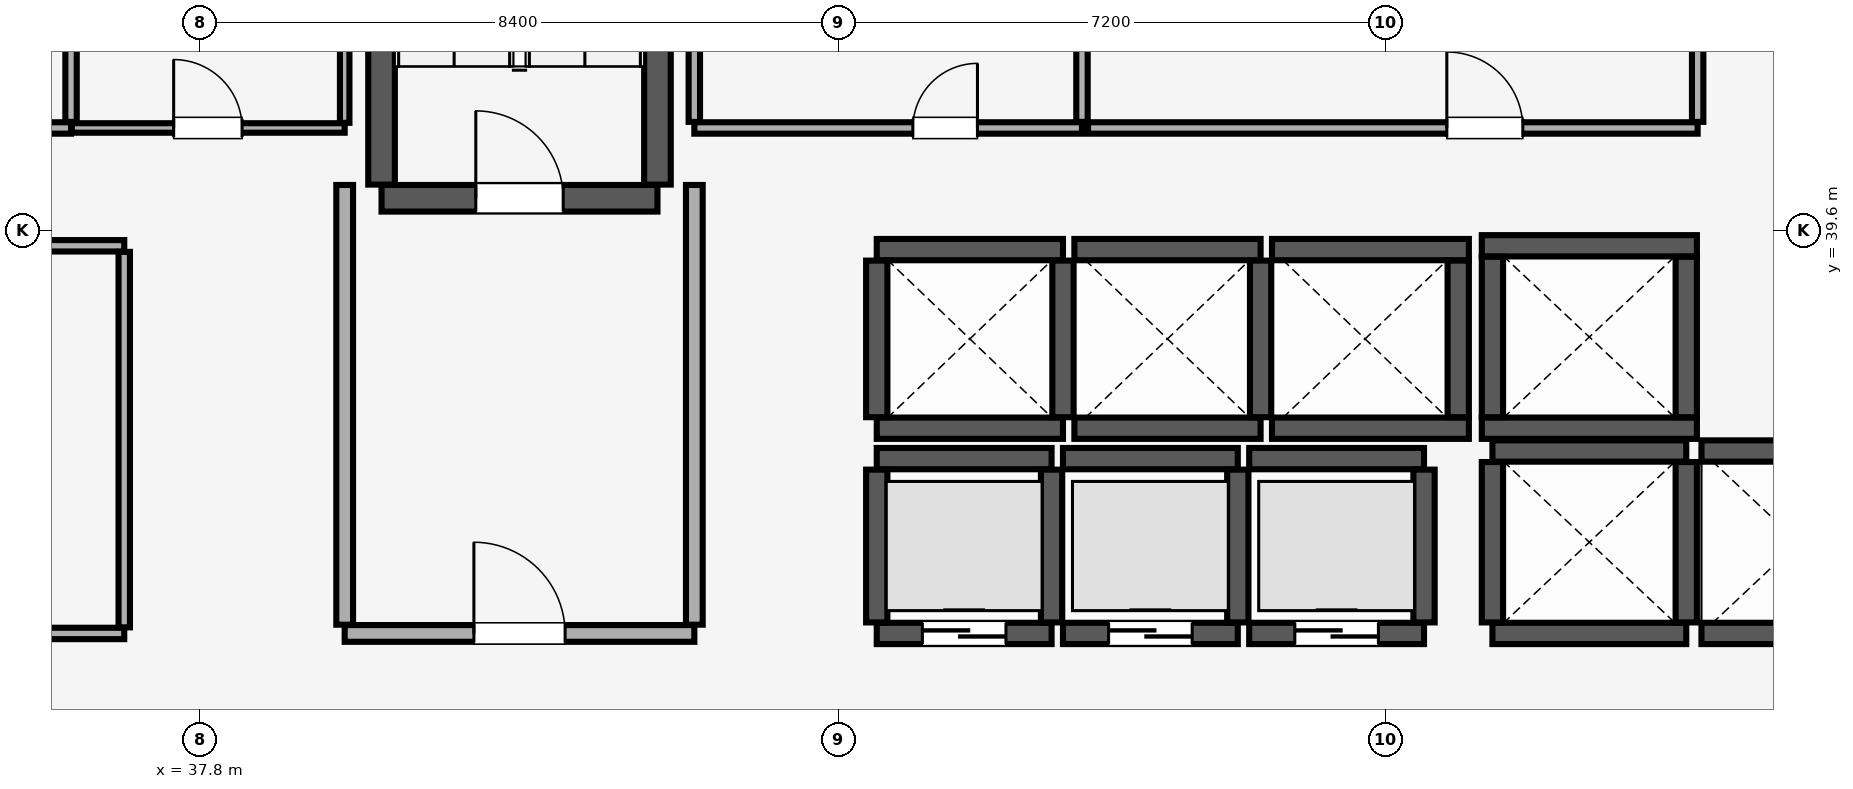
"""IFC4 building model, lengths in metres.
Left out: names, types, materials, properties, quantities, classifications, styles, units other than length and angle.
Written with IfcOpenShell. Run it as: python <this file> out.ifc"""

import sys

from ifc_helpers import new_model, si_unit, direction, frame, frame_2d, origin, place, context, subcontext, project, spatial, rectangle, extrude, element, fill, save


model = new_model("IFC4")
c1 = context("Model", 3, precision=1e-05, world=origin(), true_north=direction((0.0, 1.0)))
c2 = subcontext(c1, "Body", "Model", "MODEL_VIEW")
j1 = project(units=[si_unit("LENGTHUNIT", "METRE"), si_unit("PLANEANGLEUNIT", "RADIAN")], contexts=[c1])
p1 = place(None, origin())
s1 = spatial("IfcSite", under=j1, at=p1, CompositionType="ELEMENT")
p2 = place(p1, origin())
s2 = spatial("IfcBuilding", under=s1, at=p2, CompositionType="ELEMENT")
p3 = place(p2, frame((0.0, 0.0, 220.55)))
s3 = spatial("IfcBuildingStorey", under=s2, at=p3, CompositionType="ELEMENT", Elevation=220.55)
p4 = place(p3, frame((40.185, 40.025, 0.0), z_axis=(0.0, 0.0, 1.0), x_axis=(1.0, 0.0, 0.0)))
e1 = element("IfcWall", 1, at=p4, inside=s3, PredefinedType="SHEAR", context=c2, shape_type="SweptSolid", body=[
    extrude(rectangle(XDim=3.63, YDim=0.35, at=frame_2d((1.815, 0.0))), origin(), (0.0, 0.0, 1.0), 3.56),
])
p5 = place(p4, frame((1.24, 0.0, 0.0)))
e2 = element("IfcOpeningElement", 2, at=p5, cuts=e1, PredefinedType="OPENING", context=c2, shape_type="SweptSolid", body=[
    extrude(rectangle(XDim=1.15, YDim=2.15, at=frame_2d((0.575, 1.075))), frame((0.0, 0.185, 0.0), z_axis=(0.0, -1.0, 0.0), x_axis=(1.0, 0.0, 0.0)), (0.0, 0.0, 1.0), 0.37),
])
for number, where, z_axis, x_axis in (
    (3, (40.185, 40.205, 0.0), (0.0, 0.0, 1.0), (0.0, 1.0, 0.0)),
    (4, (43.815, 40.205, 0.0), (0.0, 0.0, 1.0), (0.0, 1.0, 0.0)),
):
    element("IfcWall", number, at=place(p3, frame(where, z_axis=z_axis, x_axis=x_axis)), inside=s3, PredefinedType="SHEAR", context=c2, shape_type="SweptSolid", body=[
        extrude(rectangle(XDim=8.09, YDim=0.35, at=frame_2d((4.045, 0.0))), origin(), (0.0, 0.0, 1.0), 3.56),
    ])
p6 = place(p3, frame((46.7, 34.3, 0.0), z_axis=(0.0, 0.0, 1.0), x_axis=(1.0, 0.0, 0.0)))
e5 = element("IfcWall", 5, at=p6, inside=s3, PredefinedType="SHEAR", context=c2, shape_type="SweptSolid", body=[
    extrude(rectangle(XDim=2.3, YDim=0.28, at=frame_2d((1.15, 0.0))), origin(), (0.0, 0.0, 1.0), 3.56),
])
p7 = place(p6, frame((0.6, 0.0, 0.0)))
e6 = element("IfcOpeningElement", 6, at=p7, cuts=e5, PredefinedType="OPENING", context=c2, shape_type="SweptSolid", body=[
    extrude(rectangle(XDim=1.1, YDim=2.2, at=frame_2d((0.55, 1.1))), frame((0.0, 0.15, 0.0), z_axis=(0.0, -1.0, 0.0), x_axis=(1.0, 0.0, 0.0)), (0.0, 0.0, 1.0), 0.3),
])
p8 = place(p3, frame((46.7, 36.6, 0.0), z_axis=(0.0, 0.0, 1.0), x_axis=(1.0, 0.0, 0.0)))
e7 = element("IfcWall", 7, at=p8, inside=s3, PredefinedType="SHEAR", context=c2, shape_type="SweptSolid", body=[
    extrude(rectangle(XDim=2.3, YDim=0.28, at=frame_2d((1.15, 0.0))), origin(), (0.0, 0.0, 1.0), 3.56),
])
for number, where, z_axis, x_axis in (
    (8, (46.7, 34.445, 0.0), (0.0, 0.0, 1.0), (0.0, 1.0, 0.0)),
    (9, (49.0, 34.445, 0.0), (0.0, 0.0, 1.0), (0.0, 1.0, 0.0)),
):
    element("IfcWall", number, at=place(p3, frame(where, z_axis=z_axis, x_axis=x_axis)), inside=s3, PredefinedType="SHEAR", context=c2, shape_type="SweptSolid", body=[
        extrude(rectangle(XDim=2.01, YDim=0.28, at=frame_2d((1.005, 0.0))), origin(), (0.0, 0.0, 1.0), 3.56),
    ])
p9 = place(p3, frame((49.15, 34.3, 0.0), z_axis=(0.0, 0.0, 1.0), x_axis=(1.0, 0.0, 0.0)))
e10 = element("IfcWall", 10, at=p9, inside=s3, PredefinedType="SHEAR", context=c2, shape_type="SweptSolid", body=[
    extrude(rectangle(XDim=2.3, YDim=0.28, at=frame_2d((1.15, 0.0))), origin(), (0.0, 0.0, 1.0), 3.56),
])
p10 = place(p9, frame((0.6, 0.0, 0.0)))
e11 = element("IfcOpeningElement", 11, at=p10, cuts=e10, PredefinedType="OPENING", context=c2, shape_type="SweptSolid", body=[
    extrude(rectangle(XDim=1.1, YDim=2.2, at=frame_2d((0.55, 1.1))), frame((0.0, 0.15, 0.0), z_axis=(0.0, -1.0, 0.0), x_axis=(1.0, 0.0, 0.0)), (0.0, 0.0, 1.0), 0.3),
])
p11 = place(p3, frame((49.15, 36.6, 0.0), z_axis=(0.0, 0.0, 1.0), x_axis=(1.0, 0.0, 0.0)))
e12 = element("IfcWall", 12, at=p11, inside=s3, PredefinedType="SHEAR", context=c2, shape_type="SweptSolid", body=[
    extrude(rectangle(XDim=2.3, YDim=0.28, at=frame_2d((1.15, 0.0))), origin(), (0.0, 0.0, 1.0), 3.56),
])
p12 = place(p3, frame((51.45, 34.445, 0.0), z_axis=(0.0, 0.0, 1.0), x_axis=(0.0, 1.0, 0.0)))
e13 = element("IfcWall", 13, at=p12, inside=s3, PredefinedType="SHEAR", context=c2, shape_type="SweptSolid", body=[
    extrude(rectangle(XDim=2.01, YDim=0.28, at=frame_2d((1.005, 0.0))), origin(), (0.0, 0.0, 1.0), 3.56),
])
p13 = place(p3, frame((51.6, 34.3, 0.0), z_axis=(0.0, 0.0, 1.0), x_axis=(1.0, 0.0, 0.0)))
e14 = element("IfcWall", 14, at=p13, inside=s3, PredefinedType="SHEAR", context=c2, shape_type="SweptSolid", body=[
    extrude(rectangle(XDim=2.3, YDim=0.28, at=frame_2d((1.15, 0.0))), origin(), (0.0, 0.0, 1.0), 3.56),
])
p14 = place(p13, frame((0.6, 0.0, 0.0)))
e15 = element("IfcOpeningElement", 15, at=p14, cuts=e14, PredefinedType="OPENING", context=c2, shape_type="SweptSolid", body=[
    extrude(rectangle(XDim=1.1, YDim=2.2, at=frame_2d((0.55, 1.1))), frame((0.0, 0.15, 0.0), z_axis=(0.0, -1.0, 0.0), x_axis=(1.0, 0.0, 0.0)), (0.0, 0.0, 1.0), 0.3),
])
p15 = place(p3, frame((51.6, 36.6, 0.0), z_axis=(0.0, 0.0, 1.0), x_axis=(1.0, 0.0, 0.0)))
e16 = element("IfcWall", 16, at=p15, inside=s3, PredefinedType="SHEAR", context=c2, shape_type="SweptSolid", body=[
    extrude(rectangle(XDim=2.3, YDim=0.28, at=frame_2d((1.15, 0.0))), origin(), (0.0, 0.0, 1.0), 3.56),
])
p16 = place(p3, frame((53.9, 34.445, 0.0), z_axis=(0.0, 0.0, 1.0), x_axis=(0.0, 1.0, 0.0)))
e17 = element("IfcWall", 17, at=p16, inside=s3, PredefinedType="SHEAR", context=c2, shape_type="SweptSolid", body=[
    extrude(rectangle(XDim=2.01, YDim=0.28, at=frame_2d((1.005, 0.0))), origin(), (0.0, 0.0, 1.0), 3.56),
])
for number, where, z_axis, x_axis in (
    (18, (46.7, 37.0, 0.0), (0.0, 0.0, 1.0), (1.0, 0.0, 0.0)),
    (19, (46.7, 39.35, 0.0), (0.0, 0.0, 1.0), (1.0, 0.0, 0.0)),
):
    element("IfcWall", number, at=place(p3, frame(where, z_axis=z_axis, x_axis=x_axis)), inside=s3, PredefinedType="SHEAR", context=c2, shape_type="SweptSolid", body=[
        extrude(rectangle(XDim=2.45, YDim=0.28, at=frame_2d((1.225, 0.0))), origin(), (0.0, 0.0, 1.0), 3.56),
    ])
for number, where, z_axis, x_axis in (
    (20, (46.7, 37.145, 0.0), (0.0, 0.0, 1.0), (0.0, 1.0, 0.0)),
    (21, (49.15, 37.145, 0.0), (0.0, 0.0, 1.0), (0.0, 1.0, 0.0)),
):
    element("IfcWall", number, at=place(p3, frame(where, z_axis=z_axis, x_axis=x_axis)), inside=s3, PredefinedType="SHEAR", context=c2, shape_type="SweptSolid", body=[
        extrude(rectangle(XDim=2.06, YDim=0.28, at=frame_2d((1.03, 0.0))), origin(), (0.0, 0.0, 1.0), 3.56),
    ])
for number, where, z_axis, x_axis in (
    (22, (49.3, 37.0, 0.0), (0.0, 0.0, 1.0), (1.0, 0.0, 0.0)),
    (23, (49.3, 39.35, 0.0), (0.0, 0.0, 1.0), (1.0, 0.0, 0.0)),
):
    element("IfcWall", number, at=place(p3, frame(where, z_axis=z_axis, x_axis=x_axis)), inside=s3, PredefinedType="SHEAR", context=c2, shape_type="SweptSolid", body=[
        extrude(rectangle(XDim=2.45, YDim=0.28, at=frame_2d((1.225, 0.0))), origin(), (0.0, 0.0, 1.0), 3.56),
    ])
p17 = place(p3, frame((51.75, 37.145, 0.0), z_axis=(0.0, 0.0, 1.0), x_axis=(0.0, 1.0, 0.0)))
e24 = element("IfcWall", 24, at=p17, inside=s3, PredefinedType="SHEAR", context=c2, shape_type="SweptSolid", body=[
    extrude(rectangle(XDim=2.06, YDim=0.28, at=frame_2d((1.03, 0.0))), origin(), (0.0, 0.0, 1.0), 3.56),
])
for number, where, z_axis, x_axis in (
    (25, (51.9, 37.0, 0.0), (0.0, 0.0, 1.0), (1.0, 0.0, 0.0)),
    (26, (51.9, 39.35, 0.0), (0.0, 0.0, 1.0), (1.0, 0.0, 0.0)),
):
    element("IfcWall", number, at=place(p3, frame(where, z_axis=z_axis, x_axis=x_axis)), inside=s3, PredefinedType="SHEAR", context=c2, shape_type="SweptSolid", body=[
        extrude(rectangle(XDim=2.59, YDim=0.28, at=frame_2d((1.295, 0.0))), origin(), (0.0, 0.0, 1.0), 3.56),
    ])
p18 = place(p3, frame((54.35, 37.145, 0.0), z_axis=(0.0, 0.0, 1.0), x_axis=(0.0, 1.0, 0.0)))
e27 = element("IfcWall", 27, at=p18, inside=s3, PredefinedType="SHEAR", context=c2, shape_type="SweptSolid", body=[
    extrude(rectangle(XDim=2.06, YDim=0.28, at=frame_2d((1.03, 0.0))), origin(), (0.0, 0.0, 1.0), 3.56),
])
for number, where, z_axis, x_axis in (
    (28, (54.8, 34.3, 0.0), (0.0, 0.0, 1.0), (1.0, 0.0, 0.0)),
    (29, (54.8, 36.7, 0.0), (0.0, 0.0, 1.0), (1.0, 0.0, 0.0)),
):
    element("IfcWall", number, at=place(p3, frame(where, z_axis=z_axis, x_axis=x_axis)), inside=s3, PredefinedType="SHEAR", context=c2, shape_type="SweptSolid", body=[
        extrude(rectangle(XDim=2.55, YDim=0.28, at=frame_2d((1.275, 0.0))), origin(), (0.0, 0.0, 1.0), 3.56),
    ])
for number, where, z_axis, x_axis in (
    (30, (54.8, 34.445, 0.0), (0.0, 0.0, 1.0), (0.0, 1.0, 0.0)),
    (31, (57.35, 34.445, 0.0), (0.0, 0.0, 1.0), (0.0, 1.0, 0.0)),
):
    element("IfcWall", number, at=place(p3, frame(where, z_axis=z_axis, x_axis=x_axis)), inside=s3, PredefinedType="SHEAR", context=c2, shape_type="SweptSolid", body=[
        extrude(rectangle(XDim=2.11, YDim=0.28, at=frame_2d((1.055, 0.0))), origin(), (0.0, 0.0, 1.0), 3.56),
    ])
for number, where, z_axis, x_axis in (
    (32, (57.55, 34.3, 0.0), (0.0, 0.0, 1.0), (1.0, 0.0, 0.0)),
    (33, (57.55, 36.7, 0.0), (0.0, 0.0, 1.0), (1.0, 0.0, 0.0)),
):
    element("IfcWall", number, at=place(p3, frame(where, z_axis=z_axis, x_axis=x_axis)), inside=s3, PredefinedType="SHEAR", context=c2, shape_type="SweptSolid", body=[
        extrude(rectangle(XDim=2.55, YDim=0.28, at=frame_2d((1.275, 0.0))), origin(), (0.0, 0.0, 1.0), 3.56),
    ])
for number, where, z_axis, x_axis in (
    (34, (54.66, 37.0, 0.0), (0.0, 0.0, 1.0), (1.0, 0.0, 0.0)),
    (35, (54.66, 39.4, 0.0), (0.0, 0.0, 1.0), (1.0, 0.0, 0.0)),
):
    element("IfcWall", number, at=place(p3, frame(where, z_axis=z_axis, x_axis=x_axis)), inside=s3, PredefinedType="SHEAR", context=c2, shape_type="SweptSolid", body=[
        extrude(rectangle(XDim=2.83, YDim=0.28, at=frame_2d((1.415, 0.0))), origin(), (0.0, 0.0, 1.0), 3.56),
    ])
for number, where, z_axis, x_axis in (
    (36, (54.8, 37.145, 0.0), (0.0, 0.0, 1.0), (0.0, 1.0, 0.0)),
    (37, (57.35, 37.145, 0.0), (0.0, 0.0, 1.0), (0.0, 1.0, 0.0)),
):
    element("IfcWall", number, at=place(p3, frame(where, z_axis=z_axis, x_axis=x_axis)), inside=s3, PredefinedType="SHEAR", context=c2, shape_type="SweptSolid", body=[
        extrude(rectangle(XDim=2.11, YDim=0.28, at=frame_2d((1.055, 0.0))), origin(), (0.0, 0.0, 1.0), 3.56),
    ])
p19 = place(p3, frame((39.7, 34.3, 0.0), z_axis=(0.0, 0.0, 1.0), x_axis=(1.0, 0.0, 0.0)))
e38 = element("IfcWall", 38, at=p19, inside=s3, PredefinedType="PARTITIONING", context=c2, shape_type="SweptSolid", body=[
    extrude(rectangle(XDim=4.6, YDim=0.22, at=frame_2d((2.3, 0.0))), origin(), (0.0, 0.0, 1.0), 3.56),
])
p20 = place(p19, frame((1.7, 0.0, 0.0)))
e39 = element("IfcOpeningElement", 39, at=p20, cuts=e38, PredefinedType="OPENING", context=c2, shape_type="SweptSolid", body=[
    extrude(rectangle(XDim=1.2, YDim=2.15, at=frame_2d((0.6, 1.075))), frame((0.0, 0.12, 0.0), z_axis=(0.0, -1.0, 0.0), x_axis=(1.0, 0.0, 0.0)), (0.0, 0.0, 1.0), 0.24),
])
for number, where, z_axis, x_axis in (
    (40, (39.7, 34.415, 0.0), (0.0, 0.0, 1.0), (0.0, 1.0, 0.0)),
    (41, (44.3, 34.415, 0.0), (0.0, 0.0, 1.0), (0.0, 1.0, 0.0)),
):
    element("IfcWall", number, at=place(p3, frame(where, z_axis=z_axis, x_axis=x_axis)), inside=s3, PredefinedType="PARTITIONING", context=c2, shape_type="SweptSolid", body=[
        extrude(rectangle(XDim=5.785, YDim=0.22, at=frame_2d((2.893, 0.0))), origin(), (0.0, 0.0, 1.0), 3.56),
    ])
p21 = place(p3, frame((31.6, 34.3, 0.0), z_axis=(0.0, 0.0, 1.0), x_axis=(1.0, 0.0, 0.0)))
e42 = element("IfcWall", 42, at=p21, inside=s3, PredefinedType="PARTITIONING", context=c2, shape_type="SweptSolid", body=[
    extrude(rectangle(XDim=5.2, YDim=0.15, at=frame_2d((2.6, 0.0))), origin(), (0.0, 0.0, 1.0), 3.56),
])
p22 = place(p21, frame((2.175, 0.0, 0.0)))
e43 = element("IfcOpeningElement", 43, at=p22, cuts=e42, PredefinedType="OPENING", context=c2, shape_type="SweptSolid", body=[
    extrude(rectangle(XDim=0.85, YDim=2.1, at=frame_2d((0.425, 1.05))), frame((0.0, 0.085, 0.0), z_axis=(0.0, -1.0, 0.0), x_axis=(1.0, 0.0, 0.0)), (0.0, 0.0, 1.0), 0.17),
])
p23 = place(p3, frame((31.6, 39.4, 0.0), z_axis=(0.0, 0.0, 1.0), x_axis=(1.0, 0.0, 0.0)))
e44 = element("IfcWall", 44, at=p23, inside=s3, PredefinedType="PARTITIONING", context=c2, shape_type="SweptSolid", body=[
    extrude(rectangle(XDim=5.2, YDim=0.15, at=frame_2d((2.6, 0.0))), origin(), (0.0, 0.0, 1.0), 3.56),
])
p24 = place(p3, frame((36.8, 34.38, 0.0), z_axis=(0.0, 0.0, 1.0), x_axis=(0.0, 1.0, 0.0)))
e45 = element("IfcWall", 45, at=p24, inside=s3, PredefinedType="PARTITIONING", context=c2, shape_type="SweptSolid", body=[
    extrude(rectangle(XDim=4.94, YDim=0.15, at=frame_2d((2.47, 0.0))), origin(), (0.0, 0.0, 1.0), 3.56),
])
p25 = place(p3, frame((28.41, 40.95, 0.0), z_axis=(0.0, 0.0, 1.0), x_axis=(1.0, 0.0, 0.0)))
e46 = element("IfcWall", 46, at=p25, inside=s3, PredefinedType="PARTITIONING", context=c2, shape_type="SweptSolid", body=[
    extrude(rectangle(XDim=7.69, YDim=0.15, at=frame_2d((3.845, 0.0))), origin(), (0.0, 0.0, 1.0), 3.56),
])
p26 = place(p25, frame((3.415, 0.0, 0.0)))
e47 = element("IfcOpeningElement", 47, at=p26, cuts=e46, PredefinedType="OPENING", context=c2, shape_type="SweptSolid", body=[
    extrude(rectangle(XDim=0.85, YDim=2.1, at=frame_2d((0.425, 1.05))), frame((0.0, 0.085, 0.0), z_axis=(0.0, -1.0, 0.0), x_axis=(1.0, 0.0, 0.0)), (0.0, 0.0, 1.0), 0.17),
])
p27 = place(p3, frame((36.1, 41.03, 0.0), z_axis=(0.0, 0.0, 1.0), x_axis=(0.0, 1.0, 0.0)))
e48 = element("IfcWall", 48, at=p27, inside=s3, PredefinedType="PARTITIONING", context=c2, shape_type="SweptSolid", body=[
    extrude(rectangle(XDim=7.82, YDim=0.15, at=frame_2d((3.91, 0.0))), origin(), (0.0, 0.0, 1.0), 3.56),
])
p28 = place(p3, frame((36.11, 40.95, 0.0), z_axis=(0.0, 0.0, 1.0), x_axis=(1.0, 0.0, 0.0)))
e49 = element("IfcWall", 49, at=p28, inside=s3, PredefinedType="PARTITIONING", context=c2, shape_type="SweptSolid", body=[
    extrude(rectangle(XDim=3.59, YDim=0.125, at=frame_2d((1.795, 0.0))), origin(), (0.0, 0.0, 1.0), 3.56),
])
p29 = place(p28, frame((1.34, 0.0, 0.0)))
e50 = element("IfcOpeningElement", 50, at=p29, cuts=e49, PredefinedType="OPENING", context=c2, shape_type="SweptSolid", body=[
    extrude(rectangle(XDim=0.9, YDim=2.1, at=frame_2d((0.45, 1.05))), frame((0.0, 0.073, 0.0), z_axis=(0.0, -1.0, 0.0), x_axis=(1.0, 0.0, 0.0)), (0.0, 0.0, 1.0), 0.145),
])
p30 = place(p3, frame((39.7, 41.018, 0.0), z_axis=(0.0, 0.0, 1.0), x_axis=(0.0, 1.0, 0.0)))
e51 = element("IfcWall", 51, at=p30, inside=s3, PredefinedType="PARTITIONING", context=c2, shape_type="SweptSolid", body=[
    extrude(rectangle(XDim=3.715, YDim=0.125, at=frame_2d((1.857, 0.0))), origin(), (0.0, 0.0, 1.0), 3.56),
])
p31 = place(p3, frame((44.3, 40.95, 0.0), z_axis=(0.0, 0.0, 1.0), x_axis=(1.0, 0.0, 0.0)))
e52 = element("IfcWall", 52, at=p31, inside=s3, PredefinedType="PARTITIONING", context=c2, shape_type="SweptSolid", body=[
    extrude(rectangle(XDim=5.1, YDim=0.15, at=frame_2d((2.55, 0.0))), origin(), (0.0, 0.0, 1.0), 3.56),
])
p32 = place(p31, frame((2.875, 0.0, 0.0)))
e53 = element("IfcOpeningElement", 53, at=p32, cuts=e52, PredefinedType="OPENING", context=c2, shape_type="SweptSolid", body=[
    extrude(rectangle(XDim=0.85, YDim=2.1, at=frame_2d((0.425, 1.05))), frame((0.0, 0.085, 0.0), z_axis=(0.0, -1.0, 0.0), x_axis=(1.0, 0.0, 0.0)), (0.0, 0.0, 1.0), 0.17),
])
for number, where, z_axis, x_axis in (
    (54, (44.3, 41.03, 0.0), (0.0, 0.0, 1.0), (0.0, 1.0, 0.0)),
    (55, (49.4, 41.03, 0.0), (0.0, 0.0, 1.0), (0.0, 1.0, 0.0)),
):
    element("IfcWall", number, at=place(p3, frame(where, z_axis=z_axis, x_axis=x_axis)), inside=s3, PredefinedType="PARTITIONING", context=c2, shape_type="SweptSolid", body=[
        extrude(rectangle(XDim=7.82, YDim=0.15, at=frame_2d((3.91, 0.0))), origin(), (0.0, 0.0, 1.0), 3.56),
    ])
p33 = place(p3, frame((49.48, 40.95, 0.0), z_axis=(0.0, 0.0, 1.0), x_axis=(1.0, 0.0, 0.0)))
e56 = element("IfcWall", 56, at=p33, inside=s3, PredefinedType="PARTITIONING", context=c2, shape_type="SweptSolid", body=[
    extrude(rectangle(XDim=8.02, YDim=0.15, at=frame_2d((4.01, 0.0))), origin(), (0.0, 0.0, 1.0), 3.56),
])
p34 = place(p33, frame((4.72, 0.0, 0.0)))
e57 = element("IfcOpeningElement", 57, at=p34, cuts=e56, PredefinedType="OPENING", context=c2, shape_type="SweptSolid", body=[
    extrude(rectangle(XDim=1.0, YDim=2.15, at=frame_2d((0.5, 1.075))), frame((0.0, 0.085, 0.0), z_axis=(0.0, -1.0, 0.0), x_axis=(1.0, 0.0, 0.0)), (0.0, 0.0, 1.0), 0.17),
])
p35 = place(p3, frame((57.5, 41.03, 0.0), z_axis=(0.0, 0.0, 1.0), x_axis=(0.0, 1.0, 0.0)))
e58 = element("IfcWall", 58, at=p35, inside=s3, PredefinedType="PARTITIONING", context=c2, shape_type="SweptSolid", body=[
    extrude(rectangle(XDim=2.155, YDim=0.15, at=frame_2d((1.078, 0.0))), origin(), (0.0, 0.0, 1.0), 3.56),
])
p36 = place(p5, origin())
e59 = element("IfcDoor", 59, at=p36, inside=s3, OperationType="SINGLE_SWING_LEFT", PredefinedType="DOOR", context=c2, shape_type="SweptSolid", body=[
    extrude(rectangle(XDim=1.15, YDim=2.15, at=frame_2d((0.575, 1.075))), frame((0.0, 0.025, 0.0), z_axis=(0.0, -1.0, 0.0), x_axis=(1.0, 0.0, 0.0)), (0.0, 0.0, 1.0), 0.05),
])
fill(e2, e59)
p37 = place(p7, origin())
e60 = element("IfcDoor", 60, at=p37, inside=s3, OperationType="DOUBLE_DOOR_SLIDING", PredefinedType="DOOR", context=c2, shape_type="SweptSolid", body=[
    extrude(rectangle(XDim=1.1, YDim=2.2, at=frame_2d((0.55, 1.1))), frame((0.0, 0.025, 0.0), z_axis=(0.0, -1.0, 0.0), x_axis=(1.0, 0.0, 0.0)), (0.0, 0.0, 1.0), 0.05),
])
fill(e6, e60)
p38 = place(p10, origin())
e61 = element("IfcDoor", 61, at=p38, inside=s3, OperationType="DOUBLE_DOOR_SLIDING", PredefinedType="DOOR", context=c2, shape_type="SweptSolid", body=[
    extrude(rectangle(XDim=1.1, YDim=2.2, at=frame_2d((0.55, 1.1))), frame((0.0, 0.025, 0.0), z_axis=(0.0, -1.0, 0.0), x_axis=(1.0, 0.0, 0.0)), (0.0, 0.0, 1.0), 0.05),
])
fill(e11, e61)
p39 = place(p14, origin())
e62 = element("IfcDoor", 62, at=p39, inside=s3, OperationType="DOUBLE_DOOR_SLIDING", PredefinedType="DOOR", context=c2, shape_type="SweptSolid", body=[
    extrude(rectangle(XDim=1.1, YDim=2.2, at=frame_2d((0.55, 1.1))), frame((0.0, 0.025, 0.0), z_axis=(0.0, -1.0, 0.0), x_axis=(1.0, 0.0, 0.0)), (0.0, 0.0, 1.0), 0.05),
])
fill(e15, e62)
p40 = place(p20, origin())
e63 = element("IfcDoor", 63, at=p40, inside=s3, OperationType="SINGLE_SWING_LEFT", PredefinedType="DOOR", context=c2, shape_type="SweptSolid", body=[
    extrude(rectangle(XDim=1.2, YDim=2.15, at=frame_2d((0.6, 1.075))), frame((0.0, 0.025, 0.0), z_axis=(0.0, -1.0, 0.0), x_axis=(1.0, 0.0, 0.0)), (0.0, 0.0, 1.0), 0.05),
])
fill(e39, e63)
p41 = place(p29, origin())
e64 = element("IfcDoor", 64, at=p41, inside=s3, OperationType="SINGLE_SWING_LEFT", PredefinedType="DOOR", context=c2, shape_type="SweptSolid", body=[
    extrude(rectangle(XDim=0.9, YDim=2.1, at=frame_2d((0.45, 1.05))), frame((0.0, 0.025, 0.0), z_axis=(0.0, -1.0, 0.0), x_axis=(1.0, 0.0, 0.0)), (0.0, 0.0, 1.0), 0.05),
])
fill(e50, e64)
p42 = place(p32, origin())
e65 = element("IfcDoor", 65, at=p42, inside=s3, OperationType="SINGLE_SWING_RIGHT", PredefinedType="DOOR", context=c2, shape_type="SweptSolid", body=[
    extrude(rectangle(XDim=0.85, YDim=2.1, at=frame_2d((0.425, 1.05))), frame((0.0, 0.025, 0.0), z_axis=(0.0, -1.0, 0.0), x_axis=(1.0, 0.0, 0.0)), (0.0, 0.0, 1.0), 0.05),
])
fill(e53, e65)
p43 = place(p34, origin())
e66 = element("IfcDoor", 66, at=p43, inside=s3, OperationType="SINGLE_SWING_LEFT", PredefinedType="DOOR", context=c2, shape_type="SweptSolid", body=[
    extrude(rectangle(XDim=1.0, YDim=2.15, at=frame_2d((0.5, 1.075))), frame((0.0, 0.025, 0.0), z_axis=(0.0, -1.0, 0.0), x_axis=(1.0, 0.0, 0.0)), (0.0, 0.0, 1.0), 0.05),
])
fill(e57, e66)
save(model, sys.argv[1])
